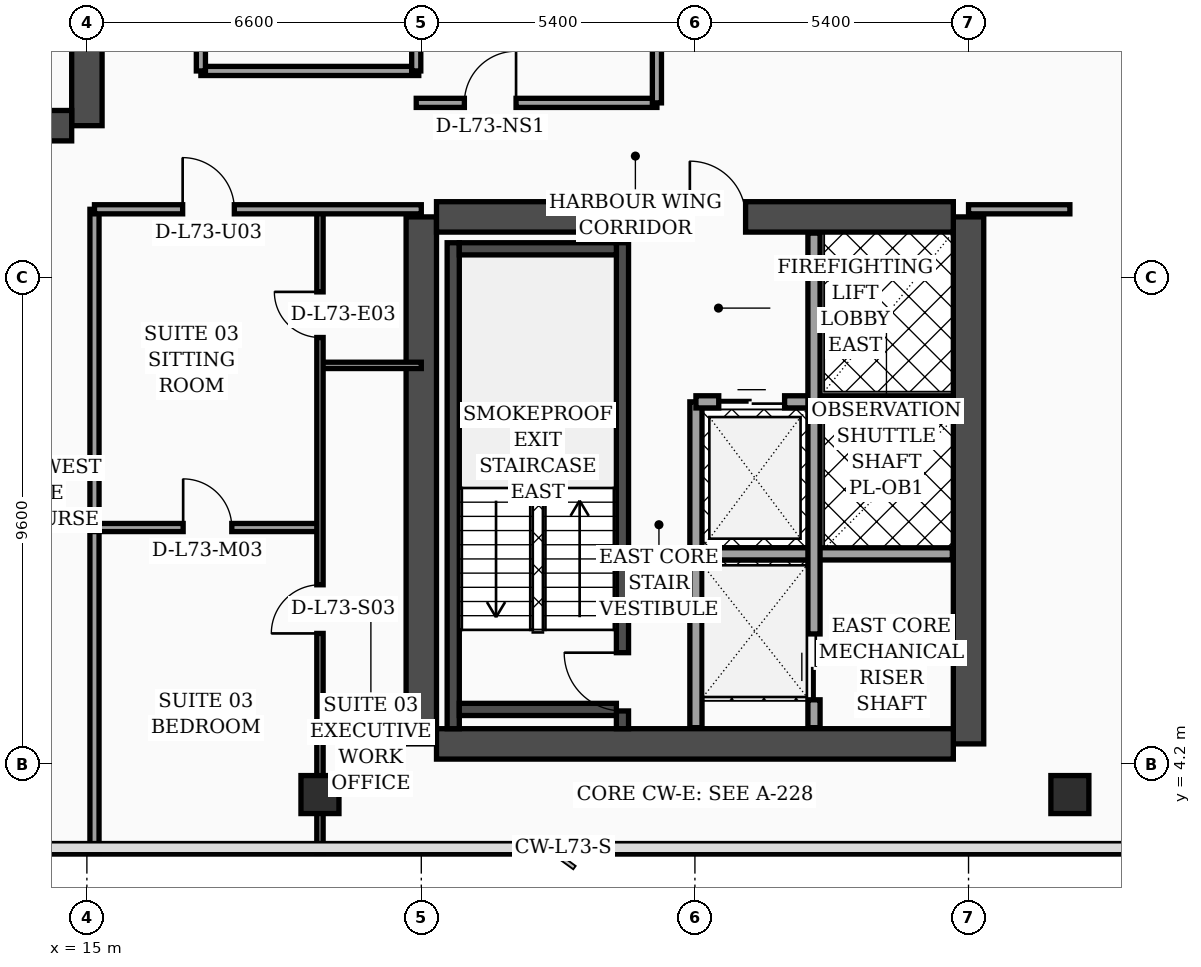
"""IFC4 building model, lengths in metres.
Left out: names, types, materials, properties, quantities, classifications, styles, units other than length and angle.
Written with IfcOpenShell. Run it as: python <this file> out.ifc"""

import sys

from ifc_helpers import new_model, si_unit, direction, frame, frame_2d, origin, origin_2d, place, context, subcontext, project, spatial, rectangle, hollow_rectangle, extrude, element, fill, save


model = new_model("IFC4")
c1 = context("Model", 3, precision=1e-05, world=origin(), true_north=direction((0.0, 1.0)))
c2 = subcontext(c1, "Body", "Model", "MODEL_VIEW")
j1 = project(units=[si_unit("LENGTHUNIT", "METRE"), si_unit("PLANEANGLEUNIT", "RADIAN")], contexts=[c1])
p1 = place(None, origin())
s1 = spatial("IfcSite", under=j1, at=p1, CompositionType="ELEMENT")
p2 = place(p1, origin())
s2 = spatial("IfcBuilding", under=s1, at=p2, CompositionType="ELEMENT")
p3 = place(p2, frame((0.0, 0.0, 294.9)))
s3 = spatial("IfcBuildingStorey", under=s2, at=p3, CompositionType="ELEMENT", Elevation=294.9)
p4 = place(p3, frame((15.0, 16.8, 0.0), z_axis=(0.0, 0.0, 1.0), x_axis=(0.0, 1.0, 0.0)))
e1 = element("IfcWall", 1, at=p4, inside=s3, PredefinedType="SHEAR", context=c2, shape_type="SweptSolid", body=[
    extrude(rectangle(XDim=21.6, YDim=0.6, at=frame_2d((10.8, 0.0))), origin(), (0.0, 0.0, 1.0), 3.56),
])
p5 = place(p4, frame((8.65, 0.0, 0.0)))
e2 = element("IfcOpeningElement", 2, at=p5, cuts=e1, PredefinedType="OPENING", context=c2, shape_type="SweptSolid", body=[
    extrude(rectangle(XDim=1.1, YDim=2.2, at=frame_2d((0.55, 1.1))), frame((0.0, 0.31, 0.0), z_axis=(0.0, -1.0, 0.0), x_axis=(1.0, 0.0, 0.0)), (0.0, 0.0, 1.0), 0.62),
])
p6 = place(p4, frame((18.9, 0.0, 0.0)))
e3 = element("IfcOpeningElement", 3, at=p6, cuts=e1, PredefinedType="OPENING", context=c2, shape_type="SweptSolid", body=[
    extrude(rectangle(XDim=1.1, YDim=2.2, at=frame_2d((0.55, 1.1))), frame((0.0, 0.31, 0.0), z_axis=(0.0, -1.0, 0.0), x_axis=(1.0, 0.0, 0.0)), (0.0, 0.0, 1.0), 0.62),
])
p7 = place(p3, frame((4.5, 16.8, 0.0), z_axis=(0.0, 0.0, 1.0), x_axis=(1.0, 0.0, 0.0)))
e4 = element("IfcWall", 4, at=p7, inside=s3, PredefinedType="SHEAR", context=c2, shape_type="SweptSolid", body=[
    extrude(rectangle(XDim=10.2, YDim=0.6, at=frame_2d((5.1, 0.0))), origin(), (0.0, 0.0, 1.0), 3.56),
])
for number, where, z_axis, x_axis in (
    (5, (21.6, 4.6, 0.0), (0.0, 0.0, 1.0), (0.0, 1.0, 0.0)),
    (6, (32.4, 4.6, 0.0), (0.0, 0.0, 1.0), (0.0, 1.0, 0.0)),
):
    element("IfcWall", number, at=place(p3, frame(where, z_axis=z_axis, x_axis=x_axis)), inside=s3, PredefinedType="SHEAR", context=c2, shape_type="SweptSolid", body=[
        extrude(rectangle(XDim=10.4, YDim=0.6, at=frame_2d((5.2, 0.0))), origin(), (0.0, 0.0, 1.0), 3.56),
    ])
p8 = place(p3, frame((21.9, 15.0, 0.0), z_axis=(0.0, 0.0, 1.0), x_axis=(1.0, 0.0, 0.0)))
e7 = element("IfcWall", 7, at=p8, inside=s3, PredefinedType="SHEAR", context=c2, shape_type="SweptSolid", body=[
    extrude(rectangle(XDim=10.2, YDim=0.6, at=frame_2d((5.1, 0.0))), origin(), (0.0, 0.0, 1.0), 3.56),
])
p9 = place(p8, frame((5.0, 0.0, 0.0)))
e8 = element("IfcOpeningElement", 8, at=p9, cuts=e7, PredefinedType="OPENING", context=c2, shape_type="SweptSolid", body=[
    extrude(rectangle(XDim=1.1, YDim=2.2, at=frame_2d((0.55, 1.1))), frame((0.0, 0.31, 0.0), z_axis=(0.0, -1.0, 0.0), x_axis=(1.0, 0.0, 0.0)), (0.0, 0.0, 1.0), 0.62),
])
p10 = place(p3, frame((21.9, 4.6, 0.0), z_axis=(0.0, 0.0, 1.0), x_axis=(1.0, 0.0, 0.0)))
e9 = element("IfcWall", 9, at=p10, inside=s3, PredefinedType="SHEAR", context=c2, shape_type="SweptSolid", body=[
    extrude(rectangle(XDim=10.2, YDim=0.6, at=frame_2d((5.1, 0.0))), origin(), (0.0, 0.0, 1.0), 3.56),
])
p11 = place(p3, frame((22.23, 4.9, 0.0), z_axis=(0.0, 0.0, 1.0), x_axis=(0.0, 1.0, 0.0)))
e10 = element("IfcWall", 10, at=p11, inside=s3, PredefinedType="SOLIDWALL", context=c2, shape_type="SweptSolid", body=[
    extrude(rectangle(XDim=9.59, YDim=0.24, at=frame_2d((4.795, 0.0))), origin(), (0.0, 0.0, 1.0), 3.56),
])
p12 = place(p3, frame((25.57, 4.9, 0.0), z_axis=(0.0, 0.0, 1.0), x_axis=(0.0, 1.0, 0.0)))
e11 = element("IfcWall", 11, at=p12, inside=s3, PredefinedType="SOLIDWALL", context=c2, shape_type="SweptSolid", body=[
    extrude(rectangle(XDim=9.59, YDim=0.24, at=frame_2d((4.795, 0.0))), origin(), (0.0, 0.0, 1.0), 3.56),
])
p13 = place(p12, frame((0.35, 0.0, 0.0)))
e12 = element("IfcOpeningElement", 12, at=p13, cuts=e11, PredefinedType="OPENING", context=c2, shape_type="SweptSolid", body=[
    extrude(rectangle(XDim=1.15, YDim=2.2, at=frame_2d((0.575, 1.1))), frame((0.0, 0.13, 0.0), z_axis=(0.0, -1.0, 0.0), x_axis=(1.0, 0.0, 0.0)), (0.0, 0.0, 1.0), 0.26),
])
for number, where, z_axis, x_axis in (
    (13, (22.35, 5.28, 0.0), (0.0, 0.0, 1.0), (1.0, 0.0, 0.0)),
    (14, (22.35, 14.37, 0.0), (0.0, 0.0, 1.0), (1.0, 0.0, 0.0)),
):
    element("IfcWall", number, at=place(p3, frame(where, z_axis=z_axis, x_axis=x_axis)), inside=s3, PredefinedType="SOLIDWALL", context=c2, shape_type="SweptSolid", body=[
        extrude(rectangle(XDim=3.1, YDim=0.24, at=frame_2d((1.55, 0.0))), origin(), (0.0, 0.0, 1.0), 3.56),
    ])
for number, where, z_axis, x_axis in (
    (15, (19.6, 3.6, 0.0), (0.0, 0.0, 1.0), (1.0, 0.0, 0.0)),
    (16, (34.4, 3.6, 0.0), (0.0, 0.0, 1.0), (1.0, 0.0, 0.0)),
):
    element("IfcColumn", number, at=place(p3, frame(where, z_axis=z_axis, x_axis=x_axis)), inside=s3, PredefinedType="COLUMN", context=c2, shape_type="SweptSolid", body=[
        extrude(hollow_rectangle(XDim=0.75, YDim=0.75, WallThickness=0.032, at=origin_2d()), origin(), (0.0, 0.0, 1.0), 3.56),
    ])
p14 = place(p3, frame((41.03, 5.505, 0.0), z_axis=(0.0, 0.0, 1.0), x_axis=(-0.300509063924, 0.953778958931, 0.0)))
e17 = element("IfcWall", 17, at=p14, inside=s3, PredefinedType="SOLIDWALL", context=c2, shape_type="SweptSolid", body=[
    extrude(rectangle(XDim=30.814, YDim=0.32, at=frame_2d((15.407, 0.0))), origin(), (0.0, 0.0, 1.0), 3.56),
])
p15 = place(p14, frame((10.199, 0.0, 0.0)))
e18 = element("IfcOpeningElement", 18, at=p15, cuts=e17, PredefinedType="OPENING", context=c2, shape_type="SweptSolid", body=[
    extrude(rectangle(XDim=1.4, YDim=2.25, at=frame_2d((0.7, 1.125))), frame((0.0, 0.17, 0.0), z_axis=(0.0, -1.0, 0.0), x_axis=(1.0, 0.0, 0.0)), (0.0, 0.0, 1.0), 0.34),
])
p16 = place(p14, frame((4.437, 0.0, 0.7)))
e19 = element("IfcOpeningElement", 19, at=p16, cuts=e17, PredefinedType="OPENING", context=c2, shape_type="SweptSolid", body=[
    extrude(rectangle(XDim=1.6, YDim=1.65, at=frame_2d((0.8, 0.825))), frame((0.0, 0.17, 0.0), z_axis=(0.0, -1.0, 0.0), x_axis=(1.0, 0.0, 0.0)), (0.0, 0.0, 1.0), 0.34),
])
p17 = place(p14, frame((18.696, 0.0, 0.7)))
e20 = element("IfcOpeningElement", 20, at=p17, cuts=e17, PredefinedType="OPENING", context=c2, shape_type="SweptSolid", body=[
    extrude(rectangle(XDim=1.6, YDim=1.65, at=frame_2d((0.8, 0.825))), frame((0.0, 0.17, 0.0), z_axis=(0.0, -1.0, 0.0), x_axis=(1.0, 0.0, 0.0)), (0.0, 0.0, 1.0), 0.34),
])
p18 = place(p14, frame((1.6, 0.0, 0.75)))
e21 = element("IfcOpeningElement", 21, at=p18, cuts=e17, PredefinedType="OPENING", context=c2, shape_type="SweptSolid", body=[
    extrude(rectangle(XDim=1.5, YDim=1.6, at=frame_2d((0.75, 0.8))), frame((0.0, 0.17, 0.0), z_axis=(0.0, -1.0, 0.0), x_axis=(1.0, 0.0, 0.0)), (0.0, 0.0, 1.0), 0.34),
])
p19 = place(p14, frame((7.8, 0.0, 0.75)))
e22 = element("IfcOpeningElement", 22, at=p19, cuts=e17, PredefinedType="OPENING", context=c2, shape_type="SweptSolid", body=[
    extrude(rectangle(XDim=1.5, YDim=1.6, at=frame_2d((0.75, 0.8))), frame((0.0, 0.17, 0.0), z_axis=(0.0, -1.0, 0.0), x_axis=(1.0, 0.0, 0.0)), (0.0, 0.0, 1.0), 0.34),
])
p20 = place(p14, frame((14.0, 0.0, 0.75)))
e23 = element("IfcOpeningElement", 23, at=p20, cuts=e17, PredefinedType="OPENING", context=c2, shape_type="SweptSolid", body=[
    extrude(rectangle(XDim=1.5, YDim=1.6, at=frame_2d((0.75, 0.8))), frame((0.0, 0.17, 0.0), z_axis=(0.0, -1.0, 0.0), x_axis=(1.0, 0.0, 0.0)), (0.0, 0.0, 1.0), 0.34),
])
p21 = place(p14, frame((16.55, 0.0, 0.75)))
e24 = element("IfcOpeningElement", 24, at=p21, cuts=e17, PredefinedType="OPENING", context=c2, shape_type="SweptSolid", body=[
    extrude(rectangle(XDim=1.5, YDim=1.6, at=frame_2d((0.75, 0.8))), frame((0.0, 0.17, 0.0), z_axis=(0.0, -1.0, 0.0), x_axis=(1.0, 0.0, 0.0)), (0.0, 0.0, 1.0), 0.34),
])
p22 = place(p14, frame((20.75, 0.0, 0.75)))
e25 = element("IfcOpeningElement", 25, at=p22, cuts=e17, PredefinedType="OPENING", context=c2, shape_type="SweptSolid", body=[
    extrude(rectangle(XDim=1.5, YDim=1.6, at=frame_2d((0.75, 0.8))), frame((0.0, 0.17, 0.0), z_axis=(0.0, -1.0, 0.0), x_axis=(1.0, 0.0, 0.0)), (0.0, 0.0, 1.0), 0.34),
])
p23 = place(p14, frame((23.3, 0.0, 0.75)))
e26 = element("IfcOpeningElement", 26, at=p23, cuts=e17, PredefinedType="OPENING", context=c2, shape_type="SweptSolid", body=[
    extrude(rectangle(XDim=1.5, YDim=1.6, at=frame_2d((0.75, 0.8))), frame((0.0, 0.17, 0.0), z_axis=(0.0, -1.0, 0.0), x_axis=(1.0, 0.0, 0.0)), (0.0, 0.0, 1.0), 0.34),
])
p24 = place(p14, frame((26.4, 0.0, 0.75)))
e27 = element("IfcOpeningElement", 27, at=p24, cuts=e17, PredefinedType="OPENING", context=c2, shape_type="SweptSolid", body=[
    extrude(rectangle(XDim=1.5, YDim=1.6, at=frame_2d((0.75, 0.8))), frame((0.0, 0.17, 0.0), z_axis=(0.0, -1.0, 0.0), x_axis=(1.0, 0.0, 0.0)), (0.0, 0.0, 1.0), 0.34),
])
p25 = place(p3, frame((27.02, 4.92, 0.0), z_axis=(0.0, 0.0, 1.0), x_axis=(0.0, 1.0, 0.0)))
e28 = element("IfcWall", 28, at=p25, inside=s3, PredefinedType="SOLIDWALL", context=c2, shape_type="SweptSolid", body=[
    extrude(rectangle(XDim=6.43, YDim=0.24, at=frame_2d((3.215, 0.0))), origin(), (0.0, 0.0, 1.0), 3.56),
])
p26 = place(p3, frame((27.02, 11.35, 0.0), z_axis=(0.0, 0.0, 1.0), x_axis=(1.0, 0.0, 0.0)))
e29 = element("IfcWall", 29, at=p26, inside=s3, PredefinedType="SOLIDWALL", context=c2, shape_type="SweptSolid", body=[
    extrude(rectangle(XDim=5.06, YDim=0.24, at=frame_2d((2.53, 0.0))), origin(), (0.0, 0.0, 1.0), 3.56),
])
p27 = place(p26, frame((0.45, 0.0, 0.0)))
e30 = element("IfcOpeningElement", 30, at=p27, cuts=e29, PredefinedType="OPENING", context=c2, shape_type="SweptSolid", body=[
    extrude(rectangle(XDim=1.3, YDim=2.35, at=frame_2d((0.65, 1.175))), frame((0.0, 0.13, 0.0), z_axis=(0.0, -1.0, 0.0), x_axis=(1.0, 0.0, 0.0)), (0.0, 0.0, 1.0), 0.26),
])
p28 = place(p3, frame((27.02, 8.35, 0.0), z_axis=(0.0, 0.0, 1.0), x_axis=(1.0, 0.0, 0.0)))
e31 = element("IfcWall", 31, at=p28, inside=s3, PredefinedType="SOLIDWALL", context=c2, shape_type="SweptSolid", body=[
    extrude(rectangle(XDim=5.06, YDim=0.24, at=frame_2d((2.53, 0.0))), origin(), (0.0, 0.0, 1.0), 3.56),
])
p29 = place(p3, frame((29.35, 4.92, 0.0), z_axis=(0.0, 0.0, 1.0), x_axis=(0.0, 1.0, 0.0)))
e32 = element("IfcWall", 32, at=p29, inside=s3, PredefinedType="SOLIDWALL", context=c2, shape_type="SweptSolid", body=[
    extrude(rectangle(XDim=9.76, YDim=0.24, at=frame_2d((4.88, 0.0))), origin(), (0.0, 0.0, 1.0), 3.56),
])
p30 = place(p29, frame((0.55, 0.0, 0.0)))
e33 = element("IfcOpeningElement", 33, at=p30, cuts=e32, PredefinedType="OPENING", context=c2, shape_type="SweptSolid", body=[
    extrude(rectangle(XDim=1.3, YDim=2.35, at=frame_2d((0.65, 1.175))), frame((0.0, 0.13, 0.0), z_axis=(0.0, -1.0, 0.0), x_axis=(1.0, 0.0, 0.0)), (0.0, 0.0, 1.0), 0.26),
])
p31 = place(p3, frame((15.15, 2.44, 0.0), z_axis=(0.0, 0.0, 1.0), x_axis=(0.0, 1.0, 0.0)))
e34 = element("IfcWall", 34, at=p31, inside=s3, PredefinedType="PARTITIONING", context=c2, shape_type="SweptSolid", body=[
    extrude(rectangle(XDim=12.71, YDim=0.18, at=frame_2d((6.355, 0.0))), origin(), (0.0, 0.0, 1.0), 3.09),
])
p32 = place(p3, frame((19.6, 12.07, 0.0), z_axis=(0.0, 0.0, 1.0), x_axis=(1.0, 0.0, 0.0)))
e35 = element("IfcWall", 35, at=p32, inside=s3, PredefinedType="PARTITIONING", context=c2, shape_type="SweptSolid", body=[
    extrude(rectangle(XDim=2.0, YDim=0.125, at=frame_2d((1.0, 0.0))), origin(), (0.0, 0.0, 1.0), 3.56),
])
p33 = place(p3, frame((15.15, 8.87, 0.0), z_axis=(0.0, 0.0, 1.0), x_axis=(1.0, 0.0, 0.0)))
e36 = element("IfcWall", 36, at=p33, inside=s3, PredefinedType="PARTITIONING", context=c2, shape_type="SweptSolid", body=[
    extrude(rectangle(XDim=4.45, YDim=0.16, at=frame_2d((2.225, 0.0))), origin(), (0.0, 0.0, 1.0), 3.56),
])
p34 = place(p33, frame((1.75, 0.0, 0.0)))
e37 = element("IfcOpeningElement", 37, at=p34, cuts=e36, PredefinedType="OPENING", context=c2, shape_type="SweptSolid", body=[
    extrude(rectangle(XDim=0.96, YDim=2.2, at=frame_2d((0.48, 1.1))), frame((0.0, 0.09, 0.0), z_axis=(0.0, -1.0, 0.0), x_axis=(1.0, 0.0, 0.0)), (0.0, 0.0, 1.0), 0.18),
])
p35 = place(p3, frame((19.6, 2.44, 0.0), z_axis=(0.0, 0.0, 1.0), x_axis=(0.0, 1.0, 0.0)))
e38 = element("IfcWall", 38, at=p35, inside=s3, PredefinedType="PARTITIONING", context=c2, shape_type="SweptSolid", body=[
    extrude(rectangle(XDim=12.71, YDim=0.125, at=frame_2d((6.355, 0.0))), origin(), (0.0, 0.0, 1.0), 2.59),
])
p36 = place(p35, frame((4.34, 0.0, 0.0)))
e39 = element("IfcOpeningElement", 39, at=p36, cuts=e38, PredefinedType="OPENING", context=c2, shape_type="SweptSolid", body=[
    extrude(rectangle(XDim=0.96, YDim=2.2, at=frame_2d((0.48, 1.1))), frame((0.0, 0.073, 0.0), z_axis=(0.0, -1.0, 0.0), x_axis=(1.0, 0.0, 0.0)), (0.0, 0.0, 1.0), 0.145),
])
p37 = place(p35, frame((10.18, 0.0, 0.0)))
e40 = element("IfcOpeningElement", 40, at=p37, cuts=e38, PredefinedType="OPENING", context=c2, shape_type="SweptSolid", body=[
    extrude(rectangle(XDim=0.9, YDim=2.15, at=frame_2d((0.45, 1.075))), frame((0.0, 0.073, 0.0), z_axis=(0.0, -1.0, 0.0), x_axis=(1.0, 0.0, 0.0)), (0.0, 0.0, 1.0), 0.145),
])
p38 = place(p3, frame((15.15, 15.15, 0.0), z_axis=(0.0, 0.0, 1.0), x_axis=(1.0, 0.0, 0.0)))
e41 = element("IfcWall", 41, at=p38, inside=s3, PredefinedType="PARTITIONING", context=c2, shape_type="SweptSolid", body=[
    extrude(rectangle(XDim=6.45, YDim=0.18, at=frame_2d((3.225, 0.0))), origin(), (0.0, 0.0, 1.0), 2.59),
])
p39 = place(p38, frame((1.74, 0.0, 0.0)))
e42 = element("IfcOpeningElement", 42, at=p39, cuts=e41, PredefinedType="OPENING", context=c2, shape_type="SweptSolid", body=[
    extrude(rectangle(XDim=1.02, YDim=2.2, at=frame_2d((0.51, 1.1))), frame((0.0, 0.1, 0.0), z_axis=(0.0, -1.0, 0.0), x_axis=(1.0, 0.0, 0.0)), (0.0, 0.0, 1.0), 0.2),
])
p40 = place(p3, frame((17.25, 17.88, 0.0), z_axis=(0.0, 0.0, 1.0), x_axis=(1.0, 0.0, 0.0)))
e43 = element("IfcWall", 43, at=p40, inside=s3, PredefinedType="PARTITIONING", context=c2, shape_type="SweptSolid", body=[
    extrude(rectangle(XDim=4.3, YDim=0.18, at=frame_2d((2.15, 0.0))), origin(), (0.0, 0.0, 1.0), 3.09),
])
p41 = place(p3, frame((21.5, 17.88, 0.0), z_axis=(0.0, 0.0, 1.0), x_axis=(0.0, 1.0, 0.0)))
e44 = element("IfcWall", 44, at=p41, inside=s3, PredefinedType="PARTITIONING", context=c2, shape_type="SweptSolid", body=[
    extrude(rectangle(XDim=6.44, YDim=0.18, at=frame_2d((3.22, 0.0))), origin(), (0.0, 0.0, 1.0), 3.09),
])
p42 = place(p3, frame((17.25, 17.88, 0.0), z_axis=(0.0, 0.0, 1.0), x_axis=(0.0, 1.0, 0.0)))
e45 = element("IfcWall", 45, at=p42, inside=s3, PredefinedType="PARTITIONING", context=c2, shape_type="SweptSolid", body=[
    extrude(rectangle(XDim=6.44, YDim=0.18, at=frame_2d((3.22, 0.0))), origin(), (0.0, 0.0, 1.0), 3.09),
])
p43 = place(p42, frame((0.65, 0.0, 0.0)))
e46 = element("IfcOpeningElement", 46, at=p43, cuts=e45, PredefinedType="OPENING", context=c2, shape_type="SweptSolid", body=[
    extrude(rectangle(XDim=0.98, YDim=2.15, at=frame_2d((0.49, 1.075))), frame((0.0, 0.1, 0.0), z_axis=(0.0, -1.0, 0.0), x_axis=(1.0, 0.0, 0.0)), (0.0, 0.0, 1.0), 0.2),
])
p44 = place(p42, frame((3.27, 0.0, 0.0)))
e47 = element("IfcOpeningElement", 47, at=p44, cuts=e45, PredefinedType="OPENING", context=c2, shape_type="SweptSolid", body=[
    extrude(rectangle(XDim=0.96, YDim=2.2, at=frame_2d((0.48, 1.1))), frame((0.0, 0.1, 0.0), z_axis=(0.0, -1.0, 0.0), x_axis=(1.0, 0.0, 0.0)), (0.0, 0.0, 1.0), 0.2),
])
p45 = place(p3, frame((32.4, 15.15, 0.0), z_axis=(0.0, 0.0, 1.0), x_axis=(1.0, 0.0, 0.0)))
e48 = element("IfcWall", 48, at=p45, inside=s3, PredefinedType="PARTITIONING", context=c2, shape_type="SweptSolid", body=[
    extrude(rectangle(XDim=2.0, YDim=0.18, at=frame_2d((1.0, 0.0))), origin(), (0.0, 0.0, 1.0), 2.99),
])
p46 = place(p3, frame((21.5, 17.25, 0.0), z_axis=(0.0, 0.0, 1.0), x_axis=(1.0, 0.0, 0.0)))
e49 = element("IfcWall", 49, at=p46, inside=s3, PredefinedType="PARTITIONING", context=c2, shape_type="SweptSolid", body=[
    extrude(rectangle(XDim=4.75, YDim=0.18, at=frame_2d((2.375, 0.0))), origin(), (0.0, 0.0, 1.0), 3.56),
])
p47 = place(p46, frame((0.95, 0.0, 0.0)))
e50 = element("IfcOpeningElement", 50, at=p47, cuts=e49, PredefinedType="OPENING", context=c2, shape_type="SweptSolid", body=[
    extrude(rectangle(XDim=1.02, YDim=2.2, at=frame_2d((0.51, 1.1))), frame((0.0, 0.1, 0.0), z_axis=(0.0, -1.0, 0.0), x_axis=(1.0, 0.0, 0.0)), (0.0, 0.0, 1.0), 0.2),
])
p48 = place(p3, frame((26.25, 17.25, 0.0), z_axis=(0.0, 0.0, 1.0), x_axis=(0.0, 1.0, 0.0)))
e51 = element("IfcWall", 51, at=p48, inside=s3, PredefinedType="PARTITIONING", context=c2, shape_type="SweptSolid", body=[
    extrude(rectangle(XDim=17.43, YDim=0.18, at=frame_2d((8.715, 0.0))), origin(), (0.0, 0.0, 1.0), 3.09),
])
p49 = place(p27, origin())
e52 = element("IfcDoor", 52, at=p49, inside=s3, OperationType="DOUBLE_DOOR_SLIDING", PredefinedType="DOOR", context=c2, shape_type="SweptSolid", body=[
    extrude(rectangle(XDim=1.3, YDim=2.35, at=frame_2d((0.65, 1.175))), frame((0.0, 0.025, 0.0), z_axis=(0.0, -1.0, 0.0), x_axis=(1.0, 0.0, 0.0)), (0.0, 0.0, 1.0), 0.05),
])
fill(e30, e52)
p50 = place(p30, origin())
e53 = element("IfcDoor", 53, at=p50, inside=s3, OperationType="DOUBLE_DOOR_SLIDING", PredefinedType="DOOR", context=c2, shape_type="SweptSolid", body=[
    extrude(rectangle(XDim=1.3, YDim=2.35, at=frame_2d((0.65, 1.175))), frame((0.0, 0.025, 0.0), z_axis=(0.0, -1.0, 0.0), x_axis=(1.0, 0.0, 0.0)), (0.0, 0.0, 1.0), 0.05),
])
fill(e33, e53)
p51 = place(p34, origin())
e54 = element("IfcDoor", 54, at=p51, inside=s3, OperationType="SINGLE_SWING_LEFT", PredefinedType="DOOR", context=c2, shape_type="SweptSolid", body=[
    extrude(rectangle(XDim=0.96, YDim=2.2, at=frame_2d((0.48, 1.1))), frame((0.0, 0.025, 0.0), z_axis=(0.0, -1.0, 0.0), x_axis=(1.0, 0.0, 0.0)), (0.0, 0.0, 1.0), 0.05),
])
fill(e37, e54)
p52 = place(p36, origin())
e55 = element("IfcDoor", 55, at=p52, inside=s3, OperationType="SINGLE_SWING_LEFT", PredefinedType="DOOR", context=c2, shape_type="SweptSolid", body=[
    extrude(rectangle(XDim=0.96, YDim=2.2, at=frame_2d((0.48, 1.1))), frame((0.0, 0.025, 0.0), z_axis=(0.0, -1.0, 0.0), x_axis=(1.0, 0.0, 0.0)), (0.0, 0.0, 1.0), 0.05),
])
fill(e39, e55)
p53 = place(p37, origin())
e56 = element("IfcDoor", 56, at=p53, inside=s3, OperationType="SINGLE_SWING_RIGHT", PredefinedType="DOOR", context=c2, shape_type="SweptSolid", body=[
    extrude(rectangle(XDim=0.9, YDim=2.15, at=frame_2d((0.45, 1.075))), frame((0.0, 0.025, 0.0), z_axis=(0.0, -1.0, 0.0), x_axis=(1.0, 0.0, 0.0)), (0.0, 0.0, 1.0), 0.05),
])
fill(e40, e56)
p54 = place(p39, origin())
e57 = element("IfcDoor", 57, at=p54, inside=s3, OperationType="SINGLE_SWING_LEFT", PredefinedType="DOOR", context=c2, shape_type="SweptSolid", body=[
    extrude(rectangle(XDim=1.02, YDim=2.2, at=frame_2d((0.51, 1.1))), frame((0.0, 0.025, 0.0), z_axis=(0.0, -1.0, 0.0), x_axis=(1.0, 0.0, 0.0)), (0.0, 0.0, 1.0), 0.05),
])
fill(e42, e57)
p55 = place(p47, origin())
e58 = element("IfcDoor", 58, at=p55, inside=s3, OperationType="SINGLE_SWING_RIGHT", PredefinedType="DOOR", context=c2, shape_type="SweptSolid", body=[
    extrude(rectangle(XDim=1.02, YDim=2.2, at=frame_2d((0.51, 1.1))), frame((0.0, 0.025, 0.0), z_axis=(0.0, -1.0, 0.0), x_axis=(1.0, 0.0, 0.0)), (0.0, 0.0, 1.0), 0.05),
])
fill(e50, e58)
p56 = place(p13, origin())
e59 = element("IfcDoor", 59, at=p56, inside=s3, OperationType="SINGLE_SWING_RIGHT", PredefinedType="DOOR", context=c2, shape_type="SweptSolid", body=[
    extrude(rectangle(XDim=1.15, YDim=2.2, at=frame_2d((0.575, 1.1))), frame((0.0, 0.025, 0.0), z_axis=(0.0, -1.0, 0.0), x_axis=(1.0, 0.0, 0.0)), (0.0, 0.0, 1.0), 0.05),
])
fill(e12, e59)
p57 = place(p9, origin())
e60 = element("IfcDoor", 60, at=p57, inside=s3, OperationType="SINGLE_SWING_LEFT", PredefinedType="DOOR", context=c2, shape_type="SweptSolid", body=[
    extrude(rectangle(XDim=1.1, YDim=2.2, at=frame_2d((0.55, 1.1))), frame((0.0, 0.025, 0.0), z_axis=(0.0, -1.0, 0.0), x_axis=(1.0, 0.0, 0.0)), (0.0, 0.0, 1.0), 0.05),
])
fill(e8, e60)
save(model, sys.argv[1])
